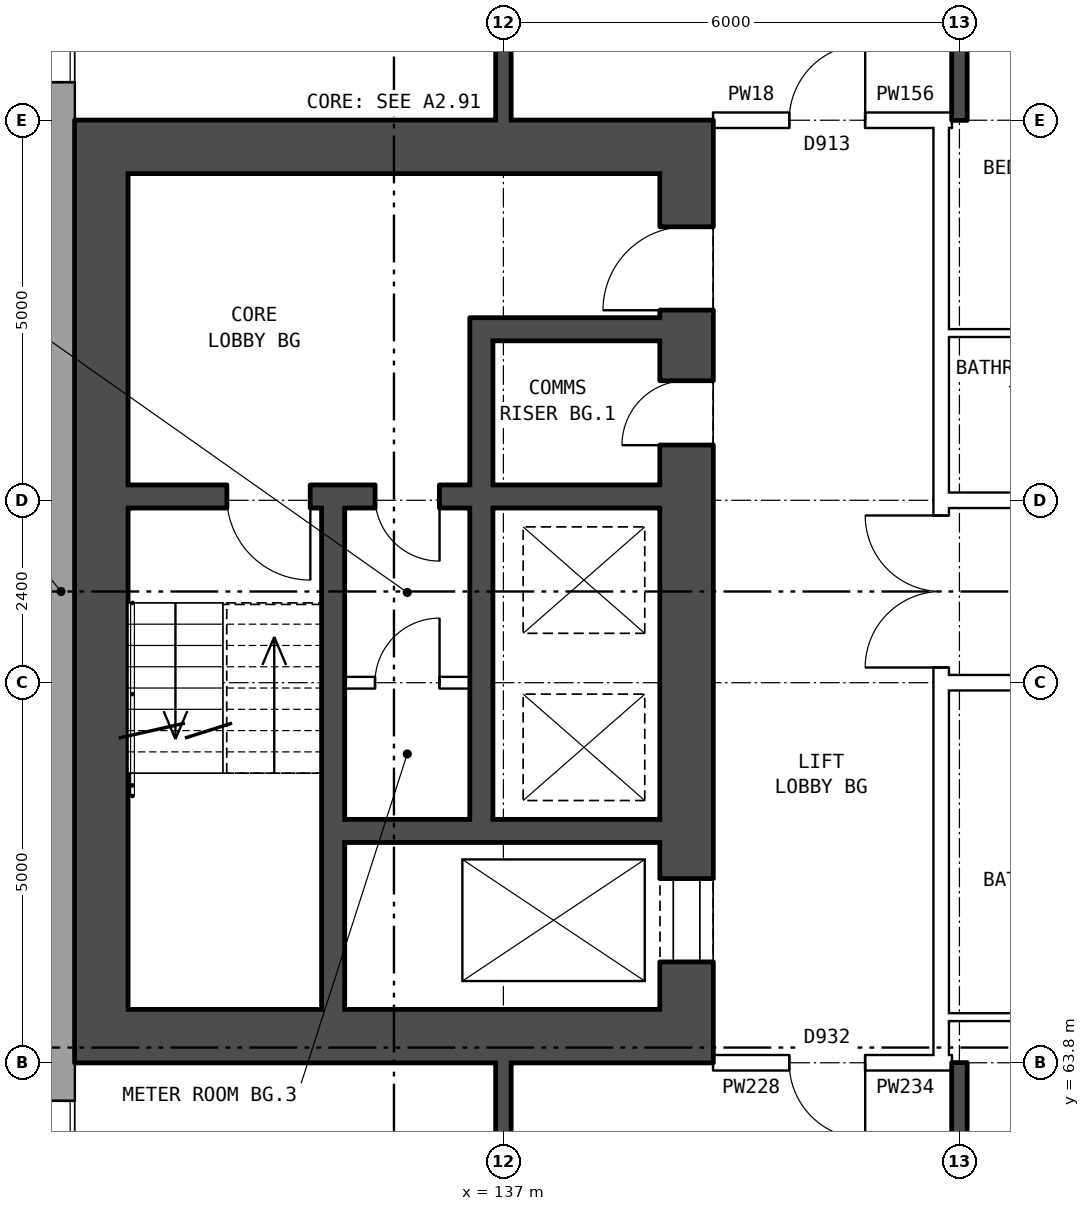
"""IFC4 building model, lengths in metres.
Left out: names, types, materials, properties, quantities, classifications, styles, units other than length and angle.
Written with IfcOpenShell. Run it as: python <this file> out.ifc"""

import sys

from ifc_helpers import new_model, si_unit, direction, frame, frame_2d, origin, place, context, subcontext, project, spatial, rectangle, extrude, element, fill, save


model = new_model("IFC4")
c1 = context("Model", 3, precision=1e-05, world=origin(), true_north=direction((0.0, 1.0)))
c2 = subcontext(c1, "Body", "Model", "MODEL_VIEW")
j1 = project(units=[si_unit("LENGTHUNIT", "METRE"), si_unit("PLANEANGLEUNIT", "RADIAN")], contexts=[c1])
p1 = place(None, origin())
s1 = spatial("IfcSite", under=j1, at=p1, CompositionType="ELEMENT")
p2 = place(p1, origin())
s2 = spatial("IfcBuilding", under=s1, at=p2, CompositionType="ELEMENT")
p3 = place(p2, frame((0.0, 0.0, 77.8)))
s3 = spatial("IfcBuildingStorey", under=s2, at=p3, CompositionType="ELEMENT", Elevation=77.8)
p4 = place(p3, frame((131.18, 82.925, 0.0), z_axis=(0.0, 0.0, 1.0), x_axis=(0.0, -1.0, 0.0)))
e1 = element("IfcWall", 1, at=p4, inside=s3, PredefinedType="STANDARD", context=c2, shape_type="SweptSolid", body=[
    extrude(rectangle(XDim=25.851, YDim=0.36, at=frame_2d((12.925, 0.0))), origin(), (0.0, 0.0, 1.0), 2.85),
])
p5 = place(p4, frame((1.625, 0.0, 0.8)))
e2 = element("IfcOpeningElement", 2, at=p5, cuts=e1, PredefinedType="OPENING", context=c2, shape_type="SweptSolid", body=[
    extrude(rectangle(XDim=1.6, YDim=1.8, at=frame_2d((0.8, 0.9))), frame((0.0, 0.19, 0.0), z_axis=(0.0, -1.0, 0.0), x_axis=(1.0, 0.0, 0.0)), (0.0, 0.0, 1.0), 0.38),
])
p6 = place(p4, frame((4.625, 0.0, 0.8)))
e3 = element("IfcOpeningElement", 3, at=p6, cuts=e1, PredefinedType="OPENING", context=c2, shape_type="SweptSolid", body=[
    extrude(rectangle(XDim=1.6, YDim=1.8, at=frame_2d((0.8, 0.9))), frame((0.0, 0.19, 0.0), z_axis=(0.0, -1.0, 0.0), x_axis=(1.0, 0.0, 0.0)), (0.0, 0.0, 1.0), 0.38),
])
p7 = place(p4, frame((19.625, 0.0, 0.8)))
e4 = element("IfcOpeningElement", 4, at=p7, cuts=e1, PredefinedType="OPENING", context=c2, shape_type="SweptSolid", body=[
    extrude(rectangle(XDim=1.6, YDim=1.8, at=frame_2d((0.8, 0.9))), frame((0.0, 0.19, 0.0), z_axis=(0.0, -1.0, 0.0), x_axis=(1.0, 0.0, 0.0)), (0.0, 0.0, 1.0), 0.38),
])
p8 = place(p4, frame((22.625, 0.0, 0.8)))
e5 = element("IfcOpeningElement", 5, at=p8, cuts=e1, PredefinedType="OPENING", context=c2, shape_type="SweptSolid", body=[
    extrude(rectangle(XDim=1.6, YDim=1.8, at=frame_2d((0.8, 0.9))), frame((0.0, 0.19, 0.0), z_axis=(0.0, -1.0, 0.0), x_axis=(1.0, 0.0, 0.0)), (0.0, 0.0, 1.0), 0.38),
])
p9 = place(p3, frame((139.41, 64.5, 0.0), z_axis=(0.0, 0.0, 1.0), x_axis=(0.0, 1.0, 0.0)))
e6 = element("IfcWall", 6, at=p9, inside=s3, PredefinedType="SHEAR", context=c2, shape_type="SweptSolid", body=[
    extrude(rectangle(XDim=11.0, YDim=0.7, at=frame_2d((5.5, 0.0))), origin(), (0.0, 0.0, 1.0), 2.85),
])
p10 = place(p9, frame((0.625, 0.0, 0.0)))
e7 = element("IfcOpeningElement", 7, at=p10, cuts=e6, PredefinedType="OPENING", context=c2, shape_type="SweptSolid", body=[
    extrude(rectangle(XDim=1.1, YDim=2.1, at=frame_2d((0.55, 1.05))), frame((0.0, 0.36, 0.0), z_axis=(0.0, -1.0, 0.0), x_axis=(1.0, 0.0, 0.0)), (0.0, 0.0, 1.0), 0.72),
])
p11 = place(p9, frame((9.2, 0.0, 0.0)))
e8 = element("IfcOpeningElement", 8, at=p11, cuts=e6, PredefinedType="OPENING", context=c2, shape_type="SweptSolid", body=[
    extrude(rectangle(XDim=1.1, YDim=2.1, at=frame_2d((0.55, 1.05))), frame((0.0, 0.36, 0.0), z_axis=(0.0, -1.0, 0.0), x_axis=(1.0, 0.0, 0.0)), (0.0, 0.0, 1.0), 0.72),
])
p12 = place(p9, frame((7.425, 0.0, 0.0)))
e9 = element("IfcOpeningElement", 9, at=p12, cuts=e6, PredefinedType="OPENING", context=c2, shape_type="SweptSolid", body=[
    extrude(rectangle(XDim=0.85, YDim=2.1, at=frame_2d((0.425, 1.05))), frame((0.0, 0.36, 0.0), z_axis=(0.0, -1.0, 0.0), x_axis=(1.0, 0.0, 0.0)), (0.0, 0.0, 1.0), 0.72),
])
p13 = place(p3, frame((131.71, 64.5, 0.0), z_axis=(0.0, 0.0, 1.0), x_axis=(0.0, 1.0, 0.0)))
e10 = element("IfcWall", 10, at=p13, inside=s3, PredefinedType="SHEAR", context=c2, shape_type="SweptSolid", body=[
    extrude(rectangle(XDim=11.0, YDim=0.7, at=frame_2d((5.5, 0.0))), origin(), (0.0, 0.0, 1.0), 2.85),
])
for number, where, z_axis, x_axis in (
    (11, (139.76, 64.15, 0.0), (0.0, 0.0, 1.0), (-1.0, 0.0, 0.0)),
    (12, (139.76, 75.85, 0.0), (0.0, 0.0, 1.0), (-1.0, 0.0, 0.0)),
):
    element("IfcWall", number, at=place(p3, frame(where, z_axis=z_axis, x_axis=x_axis)), inside=s3, PredefinedType="SHEAR", context=c2, shape_type="SweptSolid", body=[
        extrude(rectangle(XDim=8.4, YDim=0.7, at=frame_2d((4.2, 0.0))), origin(), (0.0, 0.0, 1.0), 2.85),
    ])
p14 = place(p3, frame((139.06, 66.85, 0.0), z_axis=(0.0, 0.0, 1.0), x_axis=(-1.0, 0.0, 0.0)))
e13 = element("IfcWall", 13, at=p14, inside=s3, PredefinedType="SHEAR", context=c2, shape_type="SweptSolid", body=[
    extrude(rectangle(XDim=4.15, YDim=0.3, at=frame_2d((2.075, 0.0))), origin(), (0.0, 0.0, 1.0), 2.85),
])
p15 = place(p3, frame((136.56, 68.8, 0.0), z_axis=(0.0, 0.0, 1.0), x_axis=(-1.0, 0.0, 0.0)))
e14 = element("IfcWall", 14, at=p15, inside=s3, PredefinedType="PARTITIONING", context=c2, shape_type="SweptSolid", body=[
    extrude(rectangle(XDim=1.65, YDim=0.15, at=frame_2d((0.825, 0.0))), origin(), (0.0, 0.0, 1.0), 2.85),
])
p16 = place(p15, frame((0.4, 0.0, 0.0)))
e15 = element("IfcOpeningElement", 15, at=p16, cuts=e14, PredefinedType="OPENING", context=c2, shape_type="SweptSolid", body=[
    extrude(rectangle(XDim=0.85, YDim=2.1, at=frame_2d((0.425, 1.05))), frame((0.0, 0.085, 0.0), z_axis=(0.0, -1.0, 0.0), x_axis=(1.0, 0.0, 0.0)), (0.0, 0.0, 1.0), 0.17),
])
p17 = place(p3, frame((139.06, 71.25, 0.0), z_axis=(0.0, 0.0, 1.0), x_axis=(-1.0, 0.0, 0.0)))
e16 = element("IfcWall", 16, at=p17, inside=s3, PredefinedType="SHEAR", context=c2, shape_type="SweptSolid", body=[
    extrude(rectangle(XDim=7.0, YDim=0.3, at=frame_2d((3.5, 0.0))), origin(), (0.0, 0.0, 1.0), 2.85),
])
p18 = place(p17, frame((4.6, 0.0, 0.0)))
e17 = element("IfcOpeningElement", 17, at=p18, cuts=e16, PredefinedType="OPENING", context=c2, shape_type="SweptSolid", body=[
    extrude(rectangle(XDim=1.1, YDim=2.1, at=frame_2d((0.55, 1.05))), frame((0.0, 0.16, 0.0), z_axis=(0.0, -1.0, 0.0), x_axis=(1.0, 0.0, 0.0)), (0.0, 0.0, 1.0), 0.32),
])
p19 = place(p17, frame((2.9, 0.0, 0.0)))
e18 = element("IfcOpeningElement", 18, at=p19, cuts=e16, PredefinedType="OPENING", context=c2, shape_type="SweptSolid", body=[
    extrude(rectangle(XDim=0.85, YDim=2.1, at=frame_2d((0.425, 1.05))), frame((0.0, 0.16, 0.0), z_axis=(0.0, -1.0, 0.0), x_axis=(1.0, 0.0, 0.0)), (0.0, 0.0, 1.0), 0.32),
])
p20 = place(p3, frame((139.06, 73.45, 0.0), z_axis=(0.0, 0.0, 1.0), x_axis=(-1.0, 0.0, 0.0)))
e19 = element("IfcWall", 19, at=p20, inside=s3, PredefinedType="SHEAR", context=c2, shape_type="SweptSolid", body=[
    extrude(rectangle(XDim=2.2, YDim=0.3, at=frame_2d((1.1, 0.0))), origin(), (0.0, 0.0, 1.0), 2.85),
])
p21 = place(p3, frame((136.71, 67.0, 0.0), z_axis=(0.0, 0.0, 1.0), x_axis=(0.0, 1.0, 0.0)))
e20 = element("IfcWall", 20, at=p21, inside=s3, PredefinedType="SHEAR", context=c2, shape_type="SweptSolid", body=[
    extrude(rectangle(XDim=4.1, YDim=0.3, at=frame_2d((2.05, 0.0))), origin(), (0.0, 0.0, 1.0), 2.85),
])
p22 = place(p3, frame((136.71, 71.4, 0.0), z_axis=(0.0, 0.0, 1.0), x_axis=(0.0, 1.0, 0.0)))
e21 = element("IfcWall", 21, at=p22, inside=s3, PredefinedType="SHEAR", context=c2, shape_type="SweptSolid", body=[
    extrude(rectangle(XDim=2.2, YDim=0.3, at=frame_2d((1.1, 0.0))), origin(), (0.0, 0.0, 1.0), 2.85),
])
p23 = place(p3, frame((134.76, 64.5, 0.0), z_axis=(0.0, 0.0, 1.0), x_axis=(0.0, 1.0, 0.0)))
e22 = element("IfcWall", 22, at=p23, inside=s3, PredefinedType="SHEAR", context=c2, shape_type="SweptSolid", body=[
    extrude(rectangle(XDim=6.6, YDim=0.3, at=frame_2d((3.3, 0.0))), origin(), (0.0, 0.0, 1.0), 2.85),
])
p24 = place(p3, frame((142.76, 63.9, 0.0), z_axis=(0.0, 0.0, 1.0), x_axis=(0.0, 1.0, 0.0)))
e23 = element("IfcWall", 23, at=p24, inside=s3, PredefinedType="PARTITIONING", context=c2, shape_type="SweptSolid", body=[
    extrude(rectangle(XDim=12.2, YDim=0.2, at=frame_2d((6.1, 0.0))), origin(), (0.0, 0.0, 1.0), 2.85),
])
p25 = place(p24, frame((5.1, 0.0, 0.0)))
e24 = element("IfcOpeningElement", 24, at=p25, cuts=e23, PredefinedType="OPENING", context=c2, shape_type="SweptSolid", body=[
    extrude(rectangle(XDim=2.0, YDim=2.1, at=frame_2d((1.0, 1.05))), frame((0.0, 0.11, 0.0), z_axis=(0.0, -1.0, 0.0), x_axis=(1.0, 0.0, 0.0)), (0.0, 0.0, 1.0), 0.22),
])
p26 = place(p3, frame((139.76, 63.8, 0.0), z_axis=(0.0, 0.0, 1.0), x_axis=(1.0, 0.0, 0.0)))
e25 = element("IfcWall", 25, at=p26, inside=s3, PredefinedType="PARTITIONING", context=c2, shape_type="SweptSolid", body=[
    extrude(rectangle(XDim=3.0, YDim=0.2, at=frame_2d((1.5, 0.0))), origin(), (0.0, 0.0, 1.0), 2.85),
])
p27 = place(p26, frame((1.0, 0.0, 0.0)))
e26 = element("IfcOpeningElement", 26, at=p27, cuts=e25, PredefinedType="OPENING", context=c2, shape_type="SweptSolid", body=[
    extrude(rectangle(XDim=1.0, YDim=2.1, at=frame_2d((0.5, 1.05))), frame((0.0, 0.11, 0.0), z_axis=(0.0, -1.0, 0.0), x_axis=(1.0, 0.0, 0.0)), (0.0, 0.0, 1.0), 0.22),
])
p28 = place(p3, frame((142.76, 63.8, 0.0), z_axis=(0.0, 0.0, 1.0), x_axis=(1.0, 0.0, 0.0)))
e27 = element("IfcWall", 27, at=p28, inside=s3, PredefinedType="PARTITIONING", context=c2, shape_type="SweptSolid", body=[
    extrude(rectangle(XDim=0.14, YDim=0.2, at=frame_2d((0.07, 0.0))), origin(), (0.0, 0.0, 1.0), 2.85),
])
p29 = place(p3, frame((142.76, 64.4, 0.0), z_axis=(0.0, 0.0, 1.0), x_axis=(1.0, 0.0, 0.0)))
e28 = element("IfcWall", 28, at=p29, inside=s3, PredefinedType="PARTITIONING", context=c2, shape_type="SweptSolid", body=[
    extrude(rectangle(XDim=3.24, YDim=0.1, at=frame_2d((1.62, 0.0))), origin(), (0.0, 0.0, 1.0), 2.85),
])
p30 = place(p3, frame((142.76, 68.8, 0.0), z_axis=(0.0, 0.0, 1.0), x_axis=(1.0, 0.0, 0.0)))
e29 = element("IfcWall", 29, at=p30, inside=s3, PredefinedType="PARTITIONING", context=c2, shape_type="SweptSolid", body=[
    extrude(rectangle(XDim=14.48, YDim=0.2, at=frame_2d((7.24, 0.0))), origin(), (0.0, 0.0, 1.0), 2.85),
])
p31 = place(p30, frame((4.24, 0.0, 0.0)))
e30 = element("IfcOpeningElement", 30, at=p31, cuts=e29, PredefinedType="OPENING", context=c2, shape_type="SweptSolid", body=[
    extrude(rectangle(XDim=1.0, YDim=2.1, at=frame_2d((0.5, 1.05))), frame((0.0, 0.11, 0.0), z_axis=(0.0, -1.0, 0.0), x_axis=(1.0, 0.0, 0.0)), (0.0, 0.0, 1.0), 0.22),
])
p32 = place(p30, frame((10.24, 0.0, 0.0)))
e31 = element("IfcOpeningElement", 31, at=p32, cuts=e29, PredefinedType="OPENING", context=c2, shape_type="SweptSolid", body=[
    extrude(rectangle(XDim=1.0, YDim=2.1, at=frame_2d((0.5, 1.05))), frame((0.0, 0.11, 0.0), z_axis=(0.0, -1.0, 0.0), x_axis=(1.0, 0.0, 0.0)), (0.0, 0.0, 1.0), 0.22),
])
p33 = place(p3, frame((142.76, 71.2, 0.0), z_axis=(0.0, 0.0, 1.0), x_axis=(1.0, 0.0, 0.0)))
e32 = element("IfcWall", 32, at=p33, inside=s3, PredefinedType="PARTITIONING", context=c2, shape_type="SweptSolid", body=[
    extrude(rectangle(XDim=14.48, YDim=0.2, at=frame_2d((7.24, 0.0))), origin(), (0.0, 0.0, 1.0), 2.85),
])
p34 = place(p33, frame((4.24, 0.0, 0.0)))
e33 = element("IfcOpeningElement", 33, at=p34, cuts=e32, PredefinedType="OPENING", context=c2, shape_type="SweptSolid", body=[
    extrude(rectangle(XDim=1.0, YDim=2.1, at=frame_2d((0.5, 1.05))), frame((0.0, 0.11, 0.0), z_axis=(0.0, -1.0, 0.0), x_axis=(1.0, 0.0, 0.0)), (0.0, 0.0, 1.0), 0.22),
])
p35 = place(p33, frame((7.24, 0.0, 0.0)))
e34 = element("IfcOpeningElement", 34, at=p35, cuts=e32, PredefinedType="OPENING", context=c2, shape_type="SweptSolid", body=[
    extrude(rectangle(XDim=1.0, YDim=2.1, at=frame_2d((0.5, 1.05))), frame((0.0, 0.11, 0.0), z_axis=(0.0, -1.0, 0.0), x_axis=(1.0, 0.0, 0.0)), (0.0, 0.0, 1.0), 0.22),
])
p36 = place(p3, frame((142.76, 73.4, 0.0), z_axis=(0.0, 0.0, 1.0), x_axis=(1.0, 0.0, 0.0)))
e35 = element("IfcWall", 35, at=p36, inside=s3, PredefinedType="PARTITIONING", context=c2, shape_type="SweptSolid", body=[
    extrude(rectangle(XDim=3.24, YDim=0.1, at=frame_2d((1.62, 0.0))), origin(), (0.0, 0.0, 1.0), 2.85),
])
p37 = place(p3, frame((139.76, 76.2, 0.0), z_axis=(0.0, 0.0, 1.0), x_axis=(1.0, 0.0, 0.0)))
e36 = element("IfcWall", 36, at=p37, inside=s3, PredefinedType="PARTITIONING", context=c2, shape_type="SweptSolid", body=[
    extrude(rectangle(XDim=3.0, YDim=0.2, at=frame_2d((1.5, 0.0))), origin(), (0.0, 0.0, 1.0), 2.85),
])
p38 = place(p37, frame((1.0, 0.0, 0.0)))
e37 = element("IfcOpeningElement", 37, at=p38, cuts=e36, PredefinedType="OPENING", context=c2, shape_type="SweptSolid", body=[
    extrude(rectangle(XDim=1.0, YDim=2.1, at=frame_2d((0.5, 1.05))), frame((0.0, 0.11, 0.0), z_axis=(0.0, -1.0, 0.0), x_axis=(1.0, 0.0, 0.0)), (0.0, 0.0, 1.0), 0.22),
])
p39 = place(p3, frame((142.76, 76.2, 0.0), z_axis=(0.0, 0.0, 1.0), x_axis=(1.0, 0.0, 0.0)))
e38 = element("IfcWall", 38, at=p39, inside=s3, PredefinedType="PARTITIONING", context=c2, shape_type="SweptSolid", body=[
    extrude(rectangle(XDim=0.14, YDim=0.2, at=frame_2d((0.07, 0.0))), origin(), (0.0, 0.0, 1.0), 2.85),
])
p40 = place(p3, frame((137.0, 54.36, 0.0), z_axis=(0.0, 0.0, 1.0), x_axis=(0.0, 1.0, 0.0)))
e39 = element("IfcWall", 39, at=p40, inside=s3, PredefinedType="SOLIDWALL", context=c2, shape_type="SweptSolid", body=[
    extrude(rectangle(XDim=9.44, YDim=0.2, at=frame_2d((4.72, 0.0))), origin(), (0.0, 0.0, 1.0), 2.85),
])
p41 = place(p40, frame((1.37, 0.0, 0.0)))
e40 = element("IfcOpeningElement", 40, at=p41, cuts=e39, PredefinedType="OPENING", context=c2, shape_type="SweptSolid", body=[
    extrude(rectangle(XDim=0.9, YDim=2.1, at=frame_2d((0.45, 1.05))), frame((0.0, 0.11, 0.0), z_axis=(0.0, -1.0, 0.0), x_axis=(1.0, 0.0, 0.0)), (0.0, 0.0, 1.0), 0.22),
])
p42 = place(p40, frame((7.04, 0.0, 0.0)))
e41 = element("IfcOpeningElement", 41, at=p42, cuts=e39, PredefinedType="OPENING", context=c2, shape_type="SweptSolid", body=[
    extrude(rectangle(XDim=0.9, YDim=2.1, at=frame_2d((0.45, 1.05))), frame((0.0, 0.11, 0.0), z_axis=(0.0, -1.0, 0.0), x_axis=(1.0, 0.0, 0.0)), (0.0, 0.0, 1.0), 0.22),
])
p43 = place(p3, frame((137.0, 76.2, 0.0), z_axis=(0.0, 0.0, 1.0), x_axis=(0.0, 1.0, 0.0)))
e42 = element("IfcWall", 42, at=p43, inside=s3, PredefinedType="SOLIDWALL", context=c2, shape_type="SweptSolid", body=[
    extrude(rectangle(XDim=9.44, YDim=0.2, at=frame_2d((4.72, 0.0))), origin(), (0.0, 0.0, 1.0), 2.85),
])
p44 = place(p43, frame((1.5, 0.0, 0.0)))
e43 = element("IfcOpeningElement", 43, at=p44, cuts=e42, PredefinedType="OPENING", context=c2, shape_type="SweptSolid", body=[
    extrude(rectangle(XDim=0.9, YDim=2.1, at=frame_2d((0.45, 1.05))), frame((0.0, 0.11, 0.0), z_axis=(0.0, -1.0, 0.0), x_axis=(1.0, 0.0, 0.0)), (0.0, 0.0, 1.0), 0.22),
])
for number, where, z_axis, x_axis in (
    (44, (143.0, 54.36, 0.0), (0.0, 0.0, 1.0), (0.0, 1.0, 0.0)),
    (45, (143.0, 76.2, 0.0), (0.0, 0.0, 1.0), (0.0, 1.0, 0.0)),
):
    element("IfcWall", number, at=place(p3, frame(where, z_axis=z_axis, x_axis=x_axis)), inside=s3, PredefinedType="SOLIDWALL", context=c2, shape_type="SweptSolid", body=[
        extrude(rectangle(XDim=9.44, YDim=0.2, at=frame_2d((4.72, 0.0))), origin(), (0.0, 0.0, 1.0), 2.85),
    ])
p45 = place(p6, origin())
e46 = element("IfcWindow", 46, at=p45, inside=s3, PartitioningType="SINGLE_PANEL", PredefinedType="WINDOW", context=c2, shape_type="SweptSolid", body=[
    extrude(rectangle(XDim=1.6, YDim=1.8, at=frame_2d((0.8, 0.9))), frame((0.0, 0.15, 0.0), z_axis=(0.0, -1.0, 0.0), x_axis=(1.0, 0.0, 0.0)), (0.0, 0.0, 1.0), 0.06),
])
fill(e3, e46)
p46 = place(p7, origin())
e47 = element("IfcWindow", 47, at=p46, inside=s3, PartitioningType="SINGLE_PANEL", PredefinedType="WINDOW", context=c2, shape_type="SweptSolid", body=[
    extrude(rectangle(XDim=1.6, YDim=1.8, at=frame_2d((0.8, 0.9))), frame((0.0, 0.15, 0.0), z_axis=(0.0, -1.0, 0.0), x_axis=(1.0, 0.0, 0.0)), (0.0, 0.0, 1.0), 0.06),
])
fill(e4, e47)
p47 = place(p10, origin())
e48 = element("IfcDoor", 48, at=p47, inside=s3, OperationType="DOUBLE_DOOR_SLIDING", PredefinedType="DOOR", context=c2, shape_type="SweptSolid", body=[
    extrude(rectangle(XDim=1.1, YDim=2.1, at=frame_2d((0.55, 1.05))), frame((0.0, 0.335, 0.0), z_axis=(0.0, -1.0, 0.0), x_axis=(1.0, 0.0, 0.0)), (0.0, 0.0, 1.0), 0.05),
])
fill(e7, e48)
p48 = place(p11, origin())
e49 = element("IfcDoor", 49, at=p48, inside=s3, OperationType="SINGLE_SWING_LEFT", PredefinedType="DOOR", context=c2, shape_type="SweptSolid", body=[
    extrude(rectangle(XDim=1.1, YDim=2.1, at=frame_2d((0.55, 1.05))), frame((0.0, 0.335, 0.0), z_axis=(0.0, -1.0, 0.0), x_axis=(1.0, 0.0, 0.0)), (0.0, 0.0, 1.0), 0.05),
])
fill(e8, e49)
p49 = place(p18, origin())
e50 = element("IfcDoor", 50, at=p49, inside=s3, OperationType="SINGLE_SWING_LEFT", PredefinedType="DOOR", context=c2, shape_type="SweptSolid", body=[
    extrude(rectangle(XDim=1.1, YDim=2.1, at=frame_2d((0.55, 1.05))), frame((0.0, 0.025, 0.0), z_axis=(0.0, -1.0, 0.0), x_axis=(1.0, 0.0, 0.0)), (0.0, 0.0, 1.0), 0.05),
])
fill(e17, e50)
p50 = place(p12, origin())
e51 = element("IfcDoor", 51, at=p50, inside=s3, OperationType="SINGLE_SWING_LEFT", PredefinedType="DOOR", context=c2, shape_type="SweptSolid", body=[
    extrude(rectangle(XDim=0.85, YDim=2.1, at=frame_2d((0.425, 1.05))), frame((0.0, 0.335, 0.0), z_axis=(0.0, -1.0, 0.0), x_axis=(1.0, 0.0, 0.0)), (0.0, 0.0, 1.0), 0.05),
])
fill(e9, e51)
p51 = place(p19, origin())
e52 = element("IfcDoor", 52, at=p51, inside=s3, OperationType="SINGLE_SWING_LEFT", PredefinedType="DOOR", context=c2, shape_type="SweptSolid", body=[
    extrude(rectangle(XDim=0.85, YDim=2.1, at=frame_2d((0.425, 1.05))), frame((0.0, 0.025, 0.0), z_axis=(0.0, -1.0, 0.0), x_axis=(1.0, 0.0, 0.0)), (0.0, 0.0, 1.0), 0.05),
])
fill(e18, e52)
p52 = place(p16, frame((0.85, 0.0, 0.0), z_axis=(0.0, 0.0, 1.0), x_axis=(-1.0, 0.0, 0.0)))
e53 = element("IfcDoor", 53, at=p52, inside=s3, OperationType="SINGLE_SWING_RIGHT", PredefinedType="DOOR", context=c2, shape_type="SweptSolid", body=[
    extrude(rectangle(XDim=0.85, YDim=2.1, at=frame_2d((0.425, 1.05))), frame((0.0, 0.025, 0.0), z_axis=(0.0, -1.0, 0.0), x_axis=(1.0, 0.0, 0.0)), (0.0, 0.0, 1.0), 0.05),
])
fill(e15, e53)
p53 = place(p25, origin())
e54 = element("IfcDoor", 54, at=p53, inside=s3, OperationType="DOUBLE_DOOR_SINGLE_SWING", PredefinedType="DOOR", context=c2, shape_type="SweptSolid", body=[
    extrude(rectangle(XDim=2.0, YDim=2.1, at=frame_2d((1.0, 1.05))), frame((0.0, 0.025, 0.0), z_axis=(0.0, -1.0, 0.0), x_axis=(1.0, 0.0, 0.0)), (0.0, 0.0, 1.0), 0.05),
])
fill(e24, e54)
p54 = place(p27, frame((1.0, 0.0, 0.0), z_axis=(0.0, 0.0, 1.0), x_axis=(-1.0, 0.0, 0.0)))
e55 = element("IfcDoor", 55, at=p54, inside=s3, OperationType="SINGLE_SWING_LEFT", PredefinedType="DOOR", context=c2, shape_type="SweptSolid", body=[
    extrude(rectangle(XDim=1.0, YDim=2.1, at=frame_2d((0.5, 1.05))), frame((0.0, 0.025, 0.0), z_axis=(0.0, -1.0, 0.0), x_axis=(1.0, 0.0, 0.0)), (0.0, 0.0, 1.0), 0.05),
])
fill(e26, e55)
p55 = place(p38, origin())
e56 = element("IfcDoor", 56, at=p55, inside=s3, OperationType="SINGLE_SWING_RIGHT", PredefinedType="DOOR", context=c2, shape_type="SweptSolid", body=[
    extrude(rectangle(XDim=1.0, YDim=2.1, at=frame_2d((0.5, 1.05))), frame((0.0, 0.025, 0.0), z_axis=(0.0, -1.0, 0.0), x_axis=(1.0, 0.0, 0.0)), (0.0, 0.0, 1.0), 0.05),
])
fill(e37, e56)
save(model, sys.argv[1])
